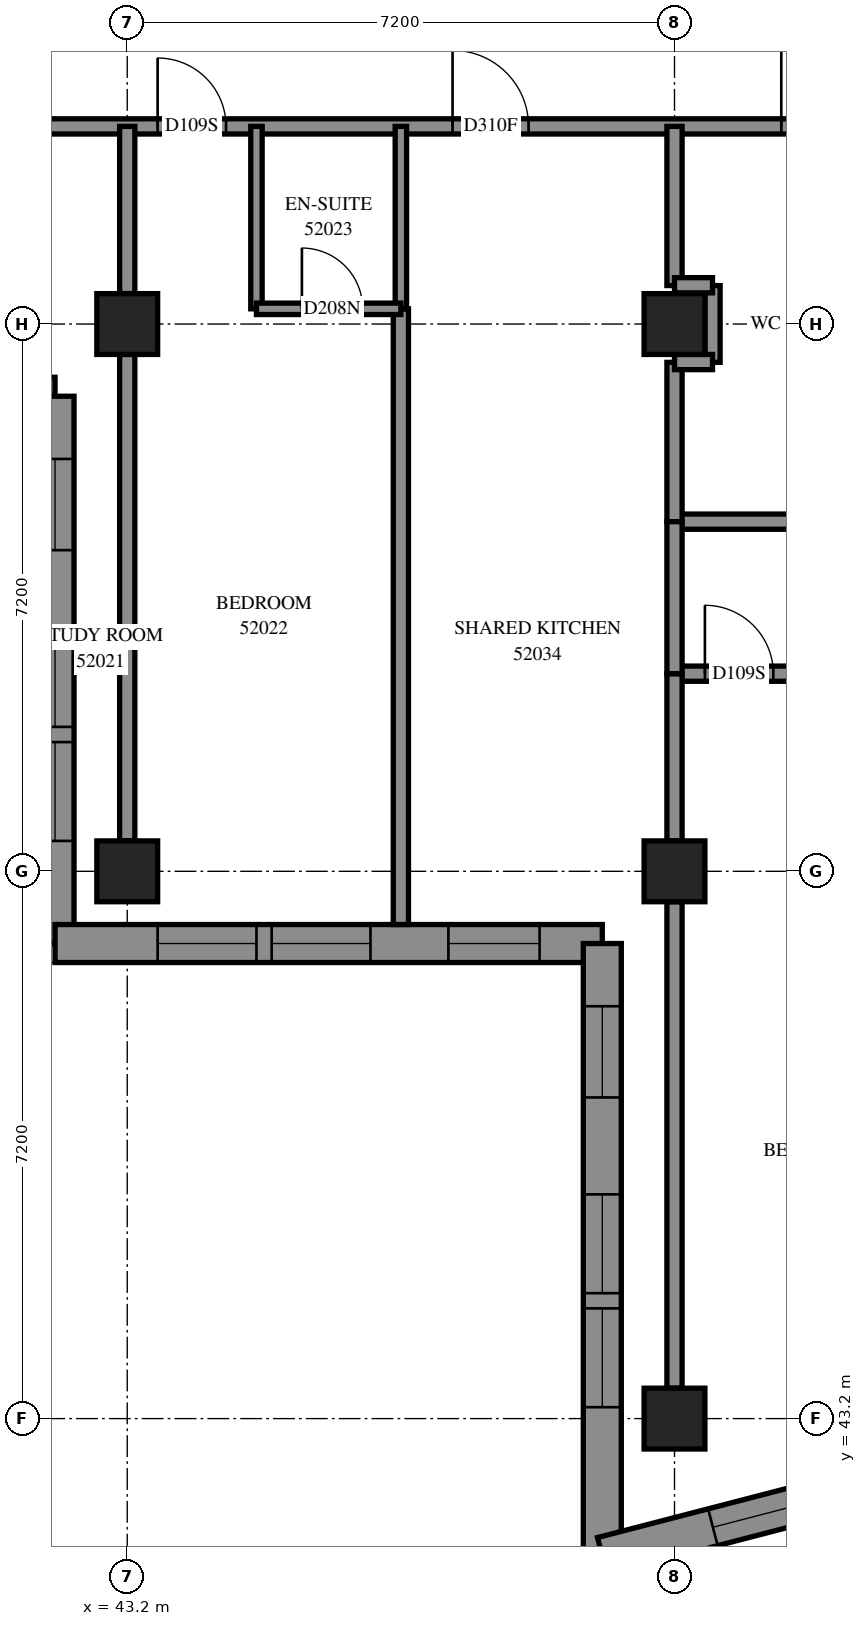
"""IFC4 building model, lengths in metres.
Left out: names, types, materials, properties, quantities, classifications, styles, units other than length and angle.
Written with IfcOpenShell. Run it as: python <this file> out.ifc"""

import sys

from ifc_helpers import new_model, si_unit, direction, frame, frame_2d, origin, origin_2d, place, context, subcontext, project, spatial, polyline, rectangle, outline, extrude, element, fill, save


model = new_model("IFC4")
c1 = context("Model", 3, precision=1e-05, world=origin(), true_north=direction((0.0, 1.0)))
c2 = subcontext(c1, "Body", "Model", "MODEL_VIEW")
j1 = project(units=[si_unit("LENGTHUNIT", "METRE"), si_unit("PLANEANGLEUNIT", "RADIAN")], contexts=[c1])
p1 = place(None, origin())
s1 = spatial("IfcSite", under=j1, at=p1, CompositionType="ELEMENT")
p2 = place(p1, origin())
s2 = spatial("IfcBuilding", under=s1, at=p2, CompositionType="ELEMENT")
p3 = place(p2, frame((0.0, 0.0, 193.0)))
s3 = spatial("IfcBuildingStorey", under=s2, at=p3, CompositionType="ELEMENT", Elevation=193.0)
for number, where, z_axis, x_axis in (
    (1, (43.2, 50.4, 0.0), (0.0, 0.0, 1.0), (1.0, 0.0, 0.0)),
    (2, (43.2, 57.6, 0.0), (0.0, 0.0, 1.0), (1.0, 0.0, 0.0)),
    (3, (50.4, 43.2, 0.0), (0.0, 0.0, 1.0), (1.0, 0.0, 0.0)),
    (4, (50.4, 50.4, 0.0), (0.0, 0.0, 1.0), (1.0, 0.0, 0.0)),
    (5, (50.4, 57.6, 0.0), (0.0, 0.0, 1.0), (1.0, 0.0, 0.0)),
):
    element("IfcColumn", number, at=place(p3, frame(where, z_axis=z_axis, x_axis=x_axis)), inside=s3, PredefinedType="COLUMN", context=c2, shape_type="SweptSolid", body=[
        extrude(rectangle(XDim=0.8, YDim=0.8, at=origin_2d()), origin(), (0.0, 0.0, 1.0), 3.1),
    ])
p4 = place(p3, frame((35.05, 56.65, 0.0), z_axis=(0.0, 0.0, 1.0), x_axis=(1.0, 0.0, 0.0)))
e6 = element("IfcWall", 6, at=p4, inside=s3, PredefinedType="SOLIDWALL", context=c2, shape_type="SweptSolid", body=[
    extrude(outline(polyline([(-0.25, -0.25), (6.95, -0.25), (7.45, 0.25), (0.25, 0.25), (-0.25, -0.25)])), origin(), (0.0, 0.0, 1.0), 3.1),
])
p5 = place(p4, frame((1.35, 0.0, 0.45)))
e7 = element("IfcOpeningElement", 7, at=p5, cuts=e6, PredefinedType="OPENING", context=c2, shape_type="SweptSolid", body=[
    extrude(rectangle(XDim=1.3, YDim=2.5, at=frame_2d((0.65, 1.25))), frame((0.0, 0.26, 0.0), z_axis=(0.0, -1.0, 0.0), x_axis=(1.0, 0.0, 0.0)), (0.0, 0.0, 1.0), 0.52),
])
p6 = place(p4, frame((2.85, 0.0, 0.45)))
e8 = element("IfcOpeningElement", 8, at=p6, cuts=e6, PredefinedType="OPENING", context=c2, shape_type="SweptSolid", body=[
    extrude(rectangle(XDim=1.3, YDim=2.5, at=frame_2d((0.65, 1.25))), frame((0.0, 0.26, 0.0), z_axis=(0.0, -1.0, 0.0), x_axis=(1.0, 0.0, 0.0)), (0.0, 0.0, 1.0), 0.52),
])
p7 = place(p4, frame((5.175, 0.0, 0.45)))
e9 = element("IfcOpeningElement", 9, at=p7, cuts=e6, PredefinedType="OPENING", context=c2, shape_type="SweptSolid", body=[
    extrude(rectangle(XDim=1.2, YDim=2.5, at=frame_2d((0.6, 1.25))), frame((0.0, 0.26, 0.0), z_axis=(0.0, -1.0, 0.0), x_axis=(1.0, 0.0, 0.0)), (0.0, 0.0, 1.0), 0.52),
])
p8 = place(p3, frame((42.25, 56.65, 0.0), z_axis=(0.0, 0.0, 1.0), x_axis=(0.0, -1.0, 0.0)))
e10 = element("IfcWall", 10, at=p8, inside=s3, PredefinedType="SOLIDWALL", context=c2, shape_type="SweptSolid", body=[
    extrude(outline(polyline([(0.25, -0.25), (7.45, -0.25), (6.95, 0.25), (-0.25, 0.25), (0.25, -0.25)])), origin(), (0.0, 0.0, 1.0), 3.1),
])
p9 = place(p8, frame((3.05, 0.0, 0.45)))
e11 = element("IfcOpeningElement", 11, at=p9, cuts=e10, PredefinedType="OPENING", context=c2, shape_type="SweptSolid", body=[
    extrude(rectangle(XDim=1.3, YDim=2.5, at=frame_2d((0.65, 1.25))), frame((0.0, 0.26, 0.0), z_axis=(0.0, -1.0, 0.0), x_axis=(1.0, 0.0, 0.0)), (0.0, 0.0, 1.0), 0.52),
])
p10 = place(p8, frame((4.55, 0.0, 0.45)))
e12 = element("IfcOpeningElement", 12, at=p10, cuts=e10, PredefinedType="OPENING", context=c2, shape_type="SweptSolid", body=[
    extrude(rectangle(XDim=1.3, YDim=2.5, at=frame_2d((0.65, 1.25))), frame((0.0, 0.26, 0.0), z_axis=(0.0, -1.0, 0.0), x_axis=(1.0, 0.0, 0.0)), (0.0, 0.0, 1.0), 0.52),
])
p11 = place(p8, frame((0.825, 0.0, 0.45)))
e13 = element("IfcOpeningElement", 13, at=p11, cuts=e10, PredefinedType="OPENING", context=c2, shape_type="SweptSolid", body=[
    extrude(rectangle(XDim=1.2, YDim=2.5, at=frame_2d((0.6, 1.25))), frame((0.0, 0.26, 0.0), z_axis=(0.0, -1.0, 0.0), x_axis=(1.0, 0.0, 0.0)), (0.0, 0.0, 1.0), 0.52),
])
p12 = place(p3, frame((42.25, 49.45, 0.0), z_axis=(0.0, 0.0, 1.0), x_axis=(1.0, 0.0, 0.0)))
e14 = element("IfcWall", 14, at=p12, inside=s3, PredefinedType="SOLIDWALL", context=c2, shape_type="SweptSolid", body=[
    extrude(outline(polyline([(-0.25, -0.25), (6.95, -0.25), (7.45, 0.25), (0.25, 0.25), (-0.25, -0.25)])), origin(), (0.0, 0.0, 1.0), 3.1),
])
p13 = place(p12, frame((1.35, 0.0, 0.45)))
e15 = element("IfcOpeningElement", 15, at=p13, cuts=e14, PredefinedType="OPENING", context=c2, shape_type="SweptSolid", body=[
    extrude(rectangle(XDim=1.3, YDim=2.5, at=frame_2d((0.65, 1.25))), frame((0.0, 0.26, 0.0), z_axis=(0.0, -1.0, 0.0), x_axis=(1.0, 0.0, 0.0)), (0.0, 0.0, 1.0), 0.52),
])
p14 = place(p12, frame((2.85, 0.0, 0.45)))
e16 = element("IfcOpeningElement", 16, at=p14, cuts=e14, PredefinedType="OPENING", context=c2, shape_type="SweptSolid", body=[
    extrude(rectangle(XDim=1.3, YDim=2.5, at=frame_2d((0.65, 1.25))), frame((0.0, 0.26, 0.0), z_axis=(0.0, -1.0, 0.0), x_axis=(1.0, 0.0, 0.0)), (0.0, 0.0, 1.0), 0.52),
])
p15 = place(p12, frame((5.175, 0.0, 0.45)))
e17 = element("IfcOpeningElement", 17, at=p15, cuts=e14, PredefinedType="OPENING", context=c2, shape_type="SweptSolid", body=[
    extrude(rectangle(XDim=1.2, YDim=2.5, at=frame_2d((0.6, 1.25))), frame((0.0, 0.26, 0.0), z_axis=(0.0, -1.0, 0.0), x_axis=(1.0, 0.0, 0.0)), (0.0, 0.0, 1.0), 0.52),
])
p16 = place(p3, frame((49.45, 49.45, 0.0), z_axis=(0.0, 0.0, 1.0), x_axis=(0.0, -1.0, 0.0)))
e18 = element("IfcWall", 18, at=p16, inside=s3, PredefinedType="SOLIDWALL", context=c2, shape_type="SweptSolid", body=[
    extrude(outline(polyline([(0.25, -0.25), (8.38, -0.25), (7.734, 0.25), (-0.25, 0.25), (0.25, -0.25)])), origin(), (0.0, 0.0, 1.0), 3.1),
])
p17 = place(p16, frame((3.3, 0.0, 0.45)))
e19 = element("IfcOpeningElement", 19, at=p17, cuts=e18, PredefinedType="OPENING", context=c2, shape_type="SweptSolid", body=[
    extrude(rectangle(XDim=1.3, YDim=2.5, at=frame_2d((0.65, 1.25))), frame((0.0, 0.26, 0.0), z_axis=(0.0, -1.0, 0.0), x_axis=(1.0, 0.0, 0.0)), (0.0, 0.0, 1.0), 0.52),
])
p18 = place(p16, frame((4.8, 0.0, 0.45)))
e20 = element("IfcOpeningElement", 20, at=p18, cuts=e18, PredefinedType="OPENING", context=c2, shape_type="SweptSolid", body=[
    extrude(rectangle(XDim=1.3, YDim=2.5, at=frame_2d((0.65, 1.25))), frame((0.0, 0.26, 0.0), z_axis=(0.0, -1.0, 0.0), x_axis=(1.0, 0.0, 0.0)), (0.0, 0.0, 1.0), 0.52),
])
p19 = place(p16, frame((0.825, 0.0, 0.45)))
e21 = element("IfcOpeningElement", 21, at=p19, cuts=e18, PredefinedType="OPENING", context=c2, shape_type="SweptSolid", body=[
    extrude(rectangle(XDim=1.2, YDim=2.5, at=frame_2d((0.6, 1.25))), frame((0.0, 0.26, 0.0), z_axis=(0.0, -1.0, 0.0), x_axis=(1.0, 0.0, 0.0)), (0.0, 0.0, 1.0), 0.52),
])
p20 = place(p3, frame((49.45, 41.393, 0.0), z_axis=(0.0, 0.0, 1.0), x_axis=(0.9679753526, 0.2510452486, 0.0)))
e22 = element("IfcWall", 22, at=p20, inside=s3, PredefinedType="SOLIDWALL", context=c2, shape_type="SweptSolid", body=[
    extrude(outline(polyline([(-0.323, -0.25), (3.381, -0.25), (3.469, 0.25), (0.323, 0.25), (-0.323, -0.25)])), origin(), (0.0, 0.0, 1.0), 3.1),
])
p21 = place(p20, frame((1.503, 0.0, 0.45)))
e23 = element("IfcOpeningElement", 23, at=p21, cuts=e22, PredefinedType="OPENING", context=c2, shape_type="SweptSolid", body=[
    extrude(rectangle(XDim=1.2, YDim=2.5, at=frame_2d((0.6, 1.25))), frame((0.0, 0.26, 0.0), z_axis=(0.0, -1.0, 0.0), x_axis=(1.0, 0.0, 0.0)), (0.0, 0.0, 1.0), 0.52),
])
p22 = place(p3, frame((36.0, 60.2, 0.0), z_axis=(0.0, 0.0, 1.0), x_axis=(1.0, 0.0, 0.0)))
e24 = element("IfcWall", 24, at=p22, inside=s3, PredefinedType="PARTITIONING", context=c2, shape_type="SweptSolid", body=[
    extrude(rectangle(XDim=17.0, YDim=0.2, at=frame_2d((8.5, 0.0))), origin(), (0.0, 0.0, 1.0), 3.1),
])
p23 = place(p22, frame((4.125, 0.0, 0.0)))
e25 = element("IfcOpeningElement", 25, at=p23, cuts=e24, PredefinedType="OPENING", context=c2, shape_type="SweptSolid", body=[
    extrude(rectangle(XDim=1.0, YDim=2.1, at=frame_2d((0.5, 1.05))), frame((0.0, 0.11, 0.0), z_axis=(0.0, -1.0, 0.0), x_axis=(1.0, 0.0, 0.0)), (0.0, 0.0, 1.0), 0.22),
])
p24 = place(p22, frame((7.6, 0.0, 0.0)))
e26 = element("IfcOpeningElement", 26, at=p24, cuts=e24, PredefinedType="OPENING", context=c2, shape_type="SweptSolid", body=[
    extrude(rectangle(XDim=0.9, YDim=2.1, at=frame_2d((0.45, 1.05))), frame((0.0, 0.11, 0.0), z_axis=(0.0, -1.0, 0.0), x_axis=(1.0, 0.0, 0.0)), (0.0, 0.0, 1.0), 0.22),
])
p25 = place(p22, frame((11.48, 0.0, 0.0)))
e27 = element("IfcOpeningElement", 27, at=p25, cuts=e24, PredefinedType="OPENING", context=c2, shape_type="SweptSolid", body=[
    extrude(rectangle(XDim=1.0, YDim=2.1, at=frame_2d((0.5, 1.05))), frame((0.0, 0.11, 0.0), z_axis=(0.0, -1.0, 0.0), x_axis=(1.0, 0.0, 0.0)), (0.0, 0.0, 1.0), 0.22),
])
p26 = place(p22, frame((15.805, 0.0, 0.0)))
e28 = element("IfcOpeningElement", 28, at=p26, cuts=e24, PredefinedType="OPENING", context=c2, shape_type="SweptSolid", body=[
    extrude(rectangle(XDim=1.0, YDim=2.1, at=frame_2d((0.5, 1.05))), frame((0.0, 0.11, 0.0), z_axis=(0.0, -1.0, 0.0), x_axis=(1.0, 0.0, 0.0)), (0.0, 0.0, 1.0), 0.22),
])
p27 = place(p3, frame((46.8, 49.7, 0.0), z_axis=(0.0, 0.0, 1.0), x_axis=(0.0, 1.0, 0.0)))
e29 = element("IfcWall", 29, at=p27, inside=s3, PredefinedType="PARTITIONING", context=c2, shape_type="SweptSolid", body=[
    extrude(rectangle(XDim=8.1, YDim=0.2, at=frame_2d((4.05, 0.0))), origin(), (0.0, 0.0, 1.0), 3.1),
])
for number, where, z_axis, x_axis in (
    (30, (43.2, 50.8, 0.0), (0.0, 0.0, 1.0), (0.0, 1.0, 0.0)),
    (31, (50.4, 43.6, 0.0), (0.0, 0.0, 1.0), (0.0, 1.0, 0.0)),
):
    element("IfcWall", number, at=place(p3, frame(where, z_axis=z_axis, x_axis=x_axis)), inside=s3, PredefinedType="PARTITIONING", context=c2, shape_type="SweptSolid", body=[
        extrude(rectangle(XDim=6.4, YDim=0.2, at=frame_2d((3.2, 0.0))), origin(), (0.0, 0.0, 1.0), 2.6),
    ])
p28 = place(p3, frame((50.4, 53.0, 0.0), z_axis=(0.0, 0.0, 1.0), x_axis=(1.0, 0.0, 0.0)))
e32 = element("IfcWall", 32, at=p28, inside=s3, PredefinedType="PARTITIONING", context=c2, shape_type="SweptSolid", body=[
    extrude(rectangle(XDim=5.2, YDim=0.2, at=frame_2d((2.6, 0.0))), origin(), (0.0, 0.0, 1.0), 3.1),
])
p29 = place(p28, frame((0.4, 0.0, 0.0)))
e33 = element("IfcOpeningElement", 33, at=p29, cuts=e32, PredefinedType="OPENING", context=c2, shape_type="SweptSolid", body=[
    extrude(rectangle(XDim=0.9, YDim=2.1, at=frame_2d((0.45, 1.05))), frame((0.0, 0.11, 0.0), z_axis=(0.0, -1.0, 0.0), x_axis=(1.0, 0.0, 0.0)), (0.0, 0.0, 1.0), 0.22),
])
p30 = place(p28, frame((3.946, 0.0, 0.0)))
e34 = element("IfcOpeningElement", 34, at=p30, cuts=e32, PredefinedType="OPENING", context=c2, shape_type="SweptSolid", body=[
    extrude(rectangle(XDim=1.0, YDim=2.1, at=frame_2d((0.5, 1.05))), frame((0.0, 0.11, 0.0), z_axis=(0.0, -1.0, 0.0), x_axis=(1.0, 0.0, 0.0)), (0.0, 0.0, 1.0), 0.22),
])
p31 = place(p3, frame((50.4, 55.0, 0.0), z_axis=(0.0, 0.0, 1.0), x_axis=(1.0, 0.0, 0.0)))
e35 = element("IfcWall", 35, at=p31, inside=s3, PredefinedType="PARTITIONING", context=c2, shape_type="SweptSolid", body=[
    extrude(rectangle(XDim=2.6, YDim=0.2, at=frame_2d((1.3, 0.0))), origin(), (0.0, 0.0, 1.0), 3.1),
])
for number, where, z_axis, x_axis in (
    (36, (44.9, 57.8, 0.0), (0.0, 0.0, 1.0), (0.0, 1.0, 0.0)),
    (37, (46.8, 57.8, 0.0), (0.0, 0.0, 1.0), (0.0, 1.0, 0.0)),
):
    element("IfcWall", number, at=place(p3, frame(where, z_axis=z_axis, x_axis=x_axis)), inside=s3, PredefinedType="PARTITIONING", context=c2, shape_type="SweptSolid", body=[
        extrude(rectangle(XDim=2.4, YDim=0.15, at=frame_2d((1.2, 0.0))), origin(), (0.0, 0.0, 1.0), 3.1),
    ])
for number, where, z_axis, x_axis in (
    (38, (43.2, 58.0, 0.0), (0.0, 0.0, 1.0), (0.0, 1.0, 0.0)),
    (39, (50.4, 50.8, 0.0), (0.0, 0.0, 1.0), (0.0, 1.0, 0.0)),
):
    element("IfcWall", number, at=place(p3, frame(where, z_axis=z_axis, x_axis=x_axis)), inside=s3, PredefinedType="PARTITIONING", context=c2, shape_type="SweptSolid", body=[
        extrude(rectangle(XDim=2.2, YDim=0.2, at=frame_2d((1.1, 0.0))), origin(), (0.0, 0.0, 1.0), 3.1),
    ])
p32 = place(p3, frame((50.4, 55.0, 0.0), z_axis=(0.0, 0.0, 1.0), x_axis=(0.0, 1.0, 0.0)))
e40 = element("IfcWall", 40, at=p32, inside=s3, PredefinedType="PARTITIONING", context=c2, shape_type="SweptSolid", body=[
    extrude(rectangle(XDim=2.096, YDim=0.2, at=frame_2d((1.048, 0.0))), origin(), (0.0, 0.0, 1.0), 3.1),
])
p33 = place(p3, frame((50.4, 58.106, 0.0), z_axis=(0.0, 0.0, 1.0), x_axis=(0.0, 1.0, 0.0)))
e41 = element("IfcWall", 41, at=p33, inside=s3, PredefinedType="PARTITIONING", context=c2, shape_type="SweptSolid", body=[
    extrude(rectangle(XDim=2.094, YDim=0.2, at=frame_2d((1.047, 0.0))), origin(), (0.0, 0.0, 1.0), 3.1),
])
p34 = place(p3, frame((50.4, 53.0, 0.0), z_axis=(0.0, 0.0, 1.0), x_axis=(0.0, 1.0, 0.0)))
e42 = element("IfcWall", 42, at=p34, inside=s3, PredefinedType="PARTITIONING", context=c2, shape_type="SweptSolid", body=[
    extrude(rectangle(XDim=2.0, YDim=0.2, at=frame_2d((1.0, 0.0))), origin(), (0.0, 0.0, 1.0), 3.1),
])
p35 = place(p3, frame((44.9, 57.8, 0.0), z_axis=(0.0, 0.0, 1.0), x_axis=(1.0, 0.0, 0.0)))
e43 = element("IfcWall", 43, at=p35, inside=s3, PredefinedType="PARTITIONING", context=c2, shape_type="SweptSolid", body=[
    extrude(rectangle(XDim=1.9, YDim=0.15, at=frame_2d((0.95, 0.0))), origin(), (0.0, 0.0, 1.0), 3.1),
])
p36 = place(p35, frame((0.598, 0.0, 0.0)))
e44 = element("IfcOpeningElement", 44, at=p36, cuts=e43, PredefinedType="OPENING", context=c2, shape_type="SweptSolid", body=[
    extrude(rectangle(XDim=0.8, YDim=2.1, at=frame_2d((0.4, 1.05))), frame((0.0, 0.085, 0.0), z_axis=(0.0, -1.0, 0.0), x_axis=(1.0, 0.0, 0.0)), (0.0, 0.0, 1.0), 0.17),
])
p37 = place(p3, frame((50.9, 57.096, 0.0), z_axis=(0.0, 0.0, 1.0), x_axis=(0.0, 1.0, 0.0)))
e45 = element("IfcWall", 45, at=p37, inside=s3, PredefinedType="PARTITIONING", context=c2, shape_type="SweptSolid", body=[
    extrude(rectangle(XDim=1.01, YDim=0.2, at=frame_2d((0.505, 0.0))), origin(), (0.0, 0.0, 1.0), 3.1),
])
for number, where, z_axis, x_axis in (
    (46, (50.4, 58.11, 0.0), (0.0, 0.0, 1.0), (1.0, 0.0, 0.0)),
    (47, (50.4, 57.1, 0.0), (0.0, 0.0, 1.0), (1.0, 0.0, 0.0)),
):
    element("IfcWall", number, at=place(p3, frame(where, z_axis=z_axis, x_axis=x_axis)), inside=s3, PredefinedType="PARTITIONING", context=c2, shape_type="SweptSolid", body=[
        extrude(rectangle(XDim=0.5, YDim=0.2, at=frame_2d((0.25, 0.0))), origin(), (0.0, 0.0, 1.0), 3.1),
    ])
p38 = place(p9, origin())
e48 = element("IfcWindow", 48, at=p38, inside=s3, PartitioningType="SINGLE_PANEL", PredefinedType="WINDOW", context=c2, shape_type="SweptSolid", body=[
    extrude(rectangle(XDim=1.3, YDim=2.5, at=frame_2d((0.65, 1.25))), frame((0.0, 0.18, 0.0), z_axis=(0.0, -1.0, 0.0), x_axis=(1.0, 0.0, 0.0)), (0.0, 0.0, 1.0), 0.06),
])
fill(e11, e48)
p39 = place(p10, origin())
e49 = element("IfcWindow", 49, at=p39, inside=s3, PartitioningType="SINGLE_PANEL", PredefinedType="WINDOW", context=c2, shape_type="SweptSolid", body=[
    extrude(rectangle(XDim=1.3, YDim=2.5, at=frame_2d((0.65, 1.25))), frame((0.0, 0.18, 0.0), z_axis=(0.0, -1.0, 0.0), x_axis=(1.0, 0.0, 0.0)), (0.0, 0.0, 1.0), 0.06),
])
fill(e12, e49)
p40 = place(p11, origin())
e50 = element("IfcWindow", 50, at=p40, inside=s3, PartitioningType="SINGLE_PANEL", PredefinedType="WINDOW", context=c2, shape_type="SweptSolid", body=[
    extrude(rectangle(XDim=1.2, YDim=2.5, at=frame_2d((0.6, 1.25))), frame((0.0, 0.18, 0.0), z_axis=(0.0, -1.0, 0.0), x_axis=(1.0, 0.0, 0.0)), (0.0, 0.0, 1.0), 0.06),
])
fill(e13, e50)
p41 = place(p13, origin())
e51 = element("IfcWindow", 51, at=p41, inside=s3, PartitioningType="SINGLE_PANEL", PredefinedType="WINDOW", context=c2, shape_type="SweptSolid", body=[
    extrude(rectangle(XDim=1.3, YDim=2.5, at=frame_2d((0.65, 1.25))), frame((0.0, 0.18, 0.0), z_axis=(0.0, -1.0, 0.0), x_axis=(1.0, 0.0, 0.0)), (0.0, 0.0, 1.0), 0.06),
])
fill(e15, e51)
p42 = place(p14, origin())
e52 = element("IfcWindow", 52, at=p42, inside=s3, PartitioningType="SINGLE_PANEL", PredefinedType="WINDOW", context=c2, shape_type="SweptSolid", body=[
    extrude(rectangle(XDim=1.3, YDim=2.5, at=frame_2d((0.65, 1.25))), frame((0.0, 0.18, 0.0), z_axis=(0.0, -1.0, 0.0), x_axis=(1.0, 0.0, 0.0)), (0.0, 0.0, 1.0), 0.06),
])
fill(e16, e52)
p43 = place(p15, origin())
e53 = element("IfcWindow", 53, at=p43, inside=s3, PartitioningType="SINGLE_PANEL", PredefinedType="WINDOW", context=c2, shape_type="SweptSolid", body=[
    extrude(rectangle(XDim=1.2, YDim=2.5, at=frame_2d((0.6, 1.25))), frame((0.0, 0.18, 0.0), z_axis=(0.0, -1.0, 0.0), x_axis=(1.0, 0.0, 0.0)), (0.0, 0.0, 1.0), 0.06),
])
fill(e17, e53)
p44 = place(p17, origin())
e54 = element("IfcWindow", 54, at=p44, inside=s3, PartitioningType="SINGLE_PANEL", PredefinedType="WINDOW", context=c2, shape_type="SweptSolid", body=[
    extrude(rectangle(XDim=1.3, YDim=2.5, at=frame_2d((0.65, 1.25))), frame((0.0, 0.18, 0.0), z_axis=(0.0, -1.0, 0.0), x_axis=(1.0, 0.0, 0.0)), (0.0, 0.0, 1.0), 0.06),
])
fill(e19, e54)
p45 = place(p18, origin())
e55 = element("IfcWindow", 55, at=p45, inside=s3, PartitioningType="SINGLE_PANEL", PredefinedType="WINDOW", context=c2, shape_type="SweptSolid", body=[
    extrude(rectangle(XDim=1.3, YDim=2.5, at=frame_2d((0.65, 1.25))), frame((0.0, 0.18, 0.0), z_axis=(0.0, -1.0, 0.0), x_axis=(1.0, 0.0, 0.0)), (0.0, 0.0, 1.0), 0.06),
])
fill(e20, e55)
p46 = place(p19, origin())
e56 = element("IfcWindow", 56, at=p46, inside=s3, PartitioningType="SINGLE_PANEL", PredefinedType="WINDOW", context=c2, shape_type="SweptSolid", body=[
    extrude(rectangle(XDim=1.2, YDim=2.5, at=frame_2d((0.6, 1.25))), frame((0.0, 0.18, 0.0), z_axis=(0.0, -1.0, 0.0), x_axis=(1.0, 0.0, 0.0)), (0.0, 0.0, 1.0), 0.06),
])
fill(e21, e56)
p47 = place(p21, origin())
e57 = element("IfcWindow", 57, at=p47, inside=s3, PartitioningType="SINGLE_PANEL", PredefinedType="WINDOW", context=c2, shape_type="SweptSolid", body=[
    extrude(rectangle(XDim=1.2, YDim=2.5, at=frame_2d((0.6, 1.25))), frame((0.0, 0.18, 0.0), z_axis=(0.0, -1.0, 0.0), x_axis=(1.0, 0.0, 0.0)), (0.0, 0.0, 1.0), 0.06),
])
fill(e23, e57)
p48 = place(p24, origin())
e58 = element("IfcDoor", 58, at=p48, inside=s3, OperationType="SINGLE_SWING_LEFT", PredefinedType="DOOR", context=c2, shape_type="SweptSolid", body=[
    extrude(rectangle(XDim=0.9, YDim=2.1, at=frame_2d((0.45, 1.05))), frame((0.0, 0.025, 0.0), z_axis=(0.0, -1.0, 0.0), x_axis=(1.0, 0.0, 0.0)), (0.0, 0.0, 1.0), 0.05),
])
fill(e26, e58)
p49 = place(p36, origin())
e59 = element("IfcDoor", 59, at=p49, inside=s3, OperationType="SINGLE_SWING_RIGHT", PredefinedType="DOOR", context=c2, shape_type="SweptSolid", body=[
    extrude(rectangle(XDim=0.8, YDim=2.1, at=frame_2d((0.4, 1.05))), frame((0.0, 0.025, 0.0), z_axis=(0.0, -1.0, 0.0), x_axis=(1.0, 0.0, 0.0)), (0.0, 0.0, 1.0), 0.05),
])
fill(e44, e59)
p50 = place(p25, origin())
e60 = element("IfcDoor", 60, at=p50, inside=s3, OperationType="SINGLE_SWING_RIGHT", PredefinedType="DOOR", context=c2, shape_type="SweptSolid", body=[
    extrude(rectangle(XDim=1.0, YDim=2.1, at=frame_2d((0.5, 1.05))), frame((0.0, 0.025, 0.0), z_axis=(0.0, -1.0, 0.0), x_axis=(1.0, 0.0, 0.0)), (0.0, 0.0, 1.0), 0.05),
])
fill(e27, e60)
p51 = place(p26, origin())
e61 = element("IfcDoor", 61, at=p51, inside=s3, OperationType="SINGLE_SWING_LEFT", PredefinedType="DOOR", context=c2, shape_type="SweptSolid", body=[
    extrude(rectangle(XDim=1.0, YDim=2.1, at=frame_2d((0.5, 1.05))), frame((0.0, 0.025, 0.0), z_axis=(0.0, -1.0, 0.0), x_axis=(1.0, 0.0, 0.0)), (0.0, 0.0, 1.0), 0.05),
])
fill(e28, e61)
p52 = place(p29, origin())
e62 = element("IfcDoor", 62, at=p52, inside=s3, OperationType="SINGLE_SWING_LEFT", PredefinedType="DOOR", context=c2, shape_type="SweptSolid", body=[
    extrude(rectangle(XDim=0.9, YDim=2.1, at=frame_2d((0.45, 1.05))), frame((0.0, 0.025, 0.0), z_axis=(0.0, -1.0, 0.0), x_axis=(1.0, 0.0, 0.0)), (0.0, 0.0, 1.0), 0.05),
])
fill(e33, e62)
save(model, sys.argv[1])
